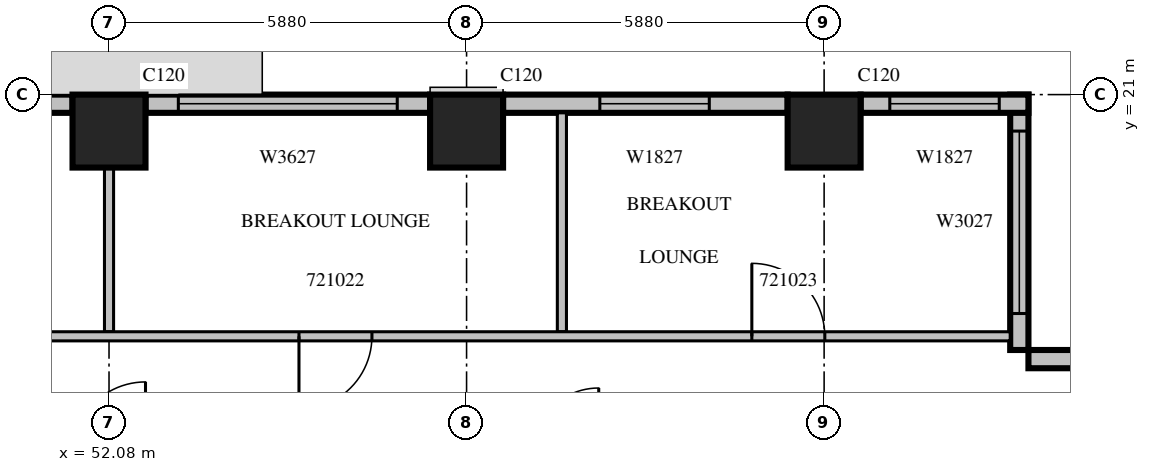
"""IFC4 building model, lengths in metres.
Left out: names, types, materials, properties, quantities, classifications, styles, units other than length and angle.
Written with IfcOpenShell. Run it as: python <this file> out.ifc"""

import sys

from ifc_helpers import new_model, si_unit, direction, frame, frame_2d, origin, origin_2d, place, context, subcontext, project, spatial, rectangle, extrude, source, transform, mapped, element, fill, save


model = new_model("IFC4")
c1 = context("Model", 3, precision=1e-05, world=origin(), true_north=direction((0.0, 1.0)))
c2 = subcontext(c1, "Body", "Model", "MODEL_VIEW")
j1 = project(units=[si_unit("LENGTHUNIT", "METRE"), si_unit("PLANEANGLEUNIT", "RADIAN")], contexts=[c1])
p1 = place(None, origin())
s1 = spatial("IfcSite", under=j1, at=p1, CompositionType="ELEMENT")
p2 = place(p1, origin())
s2 = spatial("IfcBuilding", under=s1, at=p2, CompositionType="ELEMENT")
p3 = place(p2, frame((0.0, 0.0, 99.3)))
s3 = spatial("IfcBuildingStorey", under=s2, at=p3, CompositionType="ELEMENT", Elevation=99.3)
m1 = source(origin(), c2, "Body", "SweptSolid", [
    extrude(rectangle(XDim=1.2, YDim=1.2, at=origin_2d()), origin(), (0.0, 0.0, 1.0), 4.2),
])
for number, where, z_axis, x_axis in (
    (1, (52.08, 20.4, 0.0), (0.0, 0.0, 1.0), (1.0, 0.0, 0.0)),
    (2, (57.96, 20.4, 0.0), (0.0, 0.0, 1.0), (1.0, 0.0, 0.0)),
    (3, (63.84, 20.4, 0.0), (0.0, 0.0, 1.0), (1.0, 0.0, 0.0)),
):
    element("IfcColumn", number, at=place(p3, frame(where, z_axis=z_axis, x_axis=x_axis)), inside=s3, PredefinedType="COLUMN", context=c2, shape_type="MappedRepresentation", body=[
        mapped(m1, transform((0.0, 0.0, 0.0), scale=1.0)),
    ])
m2 = source(origin(), c2, "Body", "SweptSolid", [
    extrude(rectangle(XDim=4.2, YDim=0.3, at=frame_2d((2.1, 0.0))), origin(), (0.0, 0.0, 1.0), 3.8),
])
p4 = place(p3, frame((71.4, 16.65, 0.0), z_axis=(0.0, 0.0, 1.0), x_axis=(-1.0, 0.0, 0.0)))
e4 = element("IfcWall", 4, at=p4, inside=s3, PredefinedType="STANDARD", context=c2, shape_type="MappedRepresentation", body=[
    mapped(m2, transform((0.0, 0.0, 0.0), scale=1.0)),
])
m3 = source(origin(), c2, "Body", "SweptSolid", [
    extrude(rectangle(XDim=1.2, YDim=2.7, at=frame_2d((0.6, 1.35))), frame((0.0, 0.16, 0.0), z_axis=(0.0, -1.0, 0.0), x_axis=(1.0, 0.0, 0.0)), (0.0, 0.0, 1.0), 0.32),
])
p5 = place(p4, frame((0.66, 0.0, 0.6)))
e5 = element("IfcOpeningElement", 5, at=p5, cuts=e4, PredefinedType="OPENING", context=c2, shape_type="MappedRepresentation", body=[
    mapped(m3, transform((0.0, 0.0, 0.0), scale=1.0)),
])
p6 = place(p3, frame((67.05, 16.8, 0.0), z_axis=(0.0, 0.0, 1.0), x_axis=(0.0, 1.0, 0.0)))
e6 = element("IfcWall", 6, at=p6, inside=s3, PredefinedType="STANDARD", context=c2, shape_type="MappedRepresentation", body=[
    mapped(m2, transform((0.0, 0.0, 0.0), scale=1.0)),
])
m4 = source(origin(), c2, "Body", "SweptSolid", [
    extrude(rectangle(XDim=3.0, YDim=2.7, at=frame_2d((1.5, 1.35))), frame((0.0, 0.16, 0.0), z_axis=(0.0, -1.0, 0.0), x_axis=(1.0, 0.0, 0.0)), (0.0, 0.0, 1.0), 0.32),
])
p7 = place(p6, frame((0.6, 0.0, 0.6)))
e7 = element("IfcOpeningElement", 7, at=p7, cuts=e6, PredefinedType="OPENING", context=c2, shape_type="MappedRepresentation", body=[
    mapped(m4, transform((0.0, 0.0, 0.0), scale=1.0)),
])
m5 = source(origin(), c2, "Body", "SweptSolid", [
    extrude(rectangle(XDim=2.76, YDim=0.3, at=frame_2d((1.38, 0.0))), origin(), (0.0, 0.0, 1.0), 3.8),
])
p8 = place(p3, frame((67.2, 20.85, 0.0), z_axis=(0.0, 0.0, 1.0), x_axis=(-1.0, 0.0, 0.0)))
e8 = element("IfcWall", 8, at=p8, inside=s3, PredefinedType="STANDARD", context=c2, shape_type="MappedRepresentation", body=[
    mapped(m5, transform((0.0, 0.0, 0.0), scale=1.0)),
])
m6 = source(origin(), c2, "Body", "SweptSolid", [
    extrude(rectangle(XDim=1.8, YDim=2.7, at=frame_2d((0.9, 1.35))), frame((0.0, 0.16, 0.0), z_axis=(0.0, -1.0, 0.0), x_axis=(1.0, 0.0, 0.0)), (0.0, 0.0, 1.0), 0.32),
])
p9 = place(p8, frame((0.48, 0.0, 0.6)))
e9 = element("IfcOpeningElement", 9, at=p9, cuts=e8, PredefinedType="OPENING", context=c2, shape_type="MappedRepresentation", body=[
    mapped(m6, transform((0.0, 0.0, 0.0), scale=1.0)),
])
m7 = source(origin(), c2, "Body", "SweptSolid", [
    extrude(rectangle(XDim=4.68, YDim=0.3, at=frame_2d((2.34, 0.0))), origin(), (0.0, 0.0, 1.0), 3.8),
])
p10 = place(p3, frame((63.24, 20.85, 0.0), z_axis=(0.0, 0.0, 1.0), x_axis=(-1.0, 0.0, 0.0)))
e10 = element("IfcWall", 10, at=p10, inside=s3, PredefinedType="STANDARD", context=c2, shape_type="MappedRepresentation", body=[
    mapped(m7, transform((0.0, 0.0, 0.0), scale=1.0)),
])
p11 = place(p10, frame((1.288, 0.0, 0.6)))
e11 = element("IfcOpeningElement", 11, at=p11, cuts=e10, PredefinedType="OPENING", context=c2, shape_type="MappedRepresentation", body=[
    mapped(m6, transform((0.0, 0.0, 0.0), scale=1.0)),
])
p12 = place(p3, frame((57.36, 20.85, 0.0), z_axis=(0.0, 0.0, 1.0), x_axis=(-1.0, 0.0, 0.0)))
e12 = element("IfcWall", 12, at=p12, inside=s3, PredefinedType="STANDARD", context=c2, shape_type="MappedRepresentation", body=[
    mapped(m7, transform((0.0, 0.0, 0.0), scale=1.0)),
])
m8 = source(origin(), c2, "Body", "SweptSolid", [
    extrude(rectangle(XDim=3.6, YDim=2.7, at=frame_2d((1.8, 1.35))), frame((0.0, 0.16, 0.0), z_axis=(0.0, -1.0, 0.0), x_axis=(1.0, 0.0, 0.0)), (0.0, 0.0, 1.0), 0.32),
])
p13 = place(p12, frame((0.54, 0.0, 0.6)))
e13 = element("IfcOpeningElement", 13, at=p13, cuts=e12, PredefinedType="OPENING", context=c2, shape_type="MappedRepresentation", body=[
    mapped(m8, transform((0.0, 0.0, 0.0), scale=1.0)),
])
p14 = place(p3, frame((51.48, 20.85, 0.0), z_axis=(0.0, 0.0, 1.0), x_axis=(-1.0, 0.0, 0.0)))
e14 = element("IfcWall", 14, at=p14, inside=s3, PredefinedType="STANDARD", context=c2, shape_type="MappedRepresentation", body=[
    mapped(m7, transform((0.0, 0.0, 0.0), scale=1.0)),
])
p15 = place(p14, frame((2.395, 0.0, 0.6)))
e15 = element("IfcOpeningElement", 15, at=p15, cuts=e14, PredefinedType="OPENING", context=c2, shape_type="MappedRepresentation", body=[
    mapped(m3, transform((0.0, 0.0, 0.0), scale=1.0)),
])
m9 = source(origin(), c2, "Body", "SweptSolid", [
    extrude(rectangle(XDim=3.6, YDim=0.15, at=frame_2d((1.8, 0.0))), origin(), (0.0, 0.0, 1.0), 3.8),
])
p16 = place(p3, frame((59.528, 20.7, 0.0), z_axis=(0.0, 0.0, 1.0), x_axis=(0.0, -1.0, 0.0)))
e16 = element("IfcWall", 16, at=p16, inside=s3, PredefinedType="PARTITIONING", context=c2, shape_type="MappedRepresentation", body=[
    mapped(m9, transform((0.0, 0.0, 0.0), scale=1.0)),
])
m10 = source(origin(), c2, "Body", "SweptSolid", [
    extrude(rectangle(XDim=2.701, YDim=0.15, at=frame_2d((1.351, 0.0))), origin(), (0.0, 0.0, 1.0), 3.8),
])
p17 = place(p3, frame((52.08, 17.1, 0.0), z_axis=(0.0, 0.0, 1.0), x_axis=(0.0, 1.0, 0.0)))
e17 = element("IfcWall", 17, at=p17, inside=s3, PredefinedType="PARTITIONING", context=c2, shape_type="MappedRepresentation", body=[
    mapped(m10, transform((0.0, 0.0, 0.0), scale=1.0)),
])
m11 = source(origin(), c2, "Body", "SweptSolid", [
    extrude(rectangle(XDim=37.5, YDim=0.15, at=frame_2d((18.75, 0.0))), origin(), (0.0, 0.0, 1.0), 3.3),
])
p18 = place(p3, frame((29.4, 17.025, 0.0), z_axis=(0.0, 0.0, 1.0), x_axis=(1.0, 0.0, 0.0)))
e18 = element("IfcWall", 18, at=p18, inside=s3, PredefinedType="PARTITIONING", context=c2, shape_type="MappedRepresentation", body=[
    mapped(m11, transform((0.0, 0.0, 0.0), scale=1.0)),
])
m12 = source(origin(), c2, "Body", "SweptSolid", [
    extrude(rectangle(XDim=1.0, YDim=2.1, at=frame_2d((0.5, 1.05))), frame((0.0, 0.085, 0.0), z_axis=(0.0, -1.0, 0.0), x_axis=(1.0, 0.0, 0.0)), (0.0, 0.0, 1.0), 0.17),
])
p19 = place(p18, frame((1.357, 0.0, 0.0)))
e19 = element("IfcOpeningElement", 19, at=p19, cuts=e18, PredefinedType="OPENING", context=c2, shape_type="MappedRepresentation", body=[
    mapped(m12, transform((0.0, 0.0, 0.0), scale=1.0)),
])
p20 = place(p18, frame((4.669, 0.0, 0.0)))
e20 = element("IfcOpeningElement", 20, at=p20, cuts=e18, PredefinedType="OPENING", context=c2, shape_type="MappedRepresentation", body=[
    mapped(m12, transform((0.0, 0.0, 0.0), scale=1.0)),
])
p21 = place(p18, frame((7.012, 0.0, 0.0)))
e21 = element("IfcOpeningElement", 21, at=p21, cuts=e18, PredefinedType="OPENING", context=c2, shape_type="MappedRepresentation", body=[
    mapped(m12, transform((0.0, 0.0, 0.0), scale=1.0)),
])
m13 = source(origin(), c2, "Body", "SweptSolid", [
    extrude(rectangle(XDim=0.9, YDim=2.1, at=frame_2d((0.45, 1.05))), frame((0.0, 0.085, 0.0), z_axis=(0.0, -1.0, 0.0), x_axis=(1.0, 0.0, 0.0)), (0.0, 0.0, 1.0), 0.17),
])
p22 = place(p18, frame((10.342, 0.0, 0.0)))
e22 = element("IfcOpeningElement", 22, at=p22, cuts=e18, PredefinedType="OPENING", context=c2, shape_type="MappedRepresentation", body=[
    mapped(m13, transform((0.0, 0.0, 0.0), scale=1.0)),
])
p23 = place(p18, frame((15.09, 0.0, 0.0)))
e23 = element("IfcOpeningElement", 23, at=p23, cuts=e18, PredefinedType="OPENING", context=c2, shape_type="MappedRepresentation", body=[
    mapped(m13, transform((0.0, 0.0, 0.0), scale=1.0)),
])
p24 = place(p18, frame((19.837, 0.0, 0.0)))
e24 = element("IfcOpeningElement", 24, at=p24, cuts=e18, PredefinedType="OPENING", context=c2, shape_type="MappedRepresentation", body=[
    mapped(m13, transform((0.0, 0.0, 0.0), scale=1.0)),
])
m14 = source(origin(), c2, "Body", "SweptSolid", [
    extrude(rectangle(XDim=1.2, YDim=2.1, at=frame_2d((0.6, 1.05))), frame((0.0, 0.085, 0.0), z_axis=(0.0, -1.0, 0.0), x_axis=(1.0, 0.0, 0.0)), (0.0, 0.0, 1.0), 0.17),
])
p25 = place(p18, frame((25.804, 0.0, 0.0)))
e25 = element("IfcOpeningElement", 25, at=p25, cuts=e18, PredefinedType="OPENING", context=c2, shape_type="MappedRepresentation", body=[
    mapped(m14, transform((0.0, 0.0, 0.0), scale=1.0)),
])
p26 = place(p18, frame((33.251, 0.0, 0.0)))
e26 = element("IfcOpeningElement", 26, at=p26, cuts=e18, PredefinedType="OPENING", context=c2, shape_type="MappedRepresentation", body=[
    mapped(m14, transform((0.0, 0.0, 0.0), scale=1.0)),
])
m15 = source(origin(), c2, "Body", "SweptSolid", [
    extrude(rectangle(XDim=3.0, YDim=2.7, at=frame_2d((1.5, 1.35))), frame((0.0, 0.03, 0.0), z_axis=(0.0, -1.0, 0.0), x_axis=(1.0, 0.0, 0.0)), (0.0, 0.0, 1.0), 0.06),
])
p27 = place(p7, origin())
e27 = element("IfcWindow", 27, at=p27, inside=s3, PartitioningType="SINGLE_PANEL", PredefinedType="WINDOW", context=c2, shape_type="MappedRepresentation", body=[
    mapped(m15, transform((0.0, 0.0, 0.0), scale=1.0)),
])
fill(e7, e27)
m16 = source(origin(), c2, "Body", "SweptSolid", [
    extrude(rectangle(XDim=1.8, YDim=2.7, at=frame_2d((0.9, 1.35))), frame((0.0, 0.03, 0.0), z_axis=(0.0, -1.0, 0.0), x_axis=(1.0, 0.0, 0.0)), (0.0, 0.0, 1.0), 0.06),
])
p28 = place(p11, origin())
e28 = element("IfcWindow", 28, at=p28, inside=s3, PartitioningType="SINGLE_PANEL", PredefinedType="WINDOW", context=c2, shape_type="MappedRepresentation", body=[
    mapped(m16, transform((0.0, 0.0, 0.0), scale=1.0)),
])
fill(e11, e28)
p29 = place(p9, origin())
e29 = element("IfcWindow", 29, at=p29, inside=s3, PartitioningType="SINGLE_PANEL", PredefinedType="WINDOW", context=c2, shape_type="MappedRepresentation", body=[
    mapped(m16, transform((0.0, 0.0, 0.0), scale=1.0)),
])
fill(e9, e29)
m17 = source(origin(), c2, "Body", "SweptSolid", [
    extrude(rectangle(XDim=3.6, YDim=2.7, at=frame_2d((1.8, 1.35))), frame((0.0, 0.03, 0.0), z_axis=(0.0, -1.0, 0.0), x_axis=(1.0, 0.0, 0.0)), (0.0, 0.0, 1.0), 0.06),
])
p30 = place(p13, origin())
e30 = element("IfcWindow", 30, at=p30, inside=s3, PartitioningType="SINGLE_PANEL", PredefinedType="WINDOW", context=c2, shape_type="MappedRepresentation", body=[
    mapped(m17, transform((0.0, 0.0, 0.0), scale=1.0)),
])
fill(e13, e30)
m18 = source(origin(), c2, "Body", "SweptSolid", [
    extrude(rectangle(XDim=1.2, YDim=2.1, at=frame_2d((0.6, 1.05))), frame((0.0, 0.025, 0.0), z_axis=(0.0, -1.0, 0.0), x_axis=(1.0, 0.0, 0.0)), (0.0, 0.0, 1.0), 0.05),
])
p31 = place(p25, origin())
e31 = element("IfcDoor", 31, at=p31, inside=s3, OperationType="SINGLE_SWING_RIGHT", PredefinedType="DOOR", context=c2, shape_type="MappedRepresentation", body=[
    mapped(m18, transform((0.0, 0.0, 0.0), scale=1.0)),
])
fill(e25, e31)
p32 = place(p26, origin())
e32 = element("IfcDoor", 32, at=p32, inside=s3, OperationType="SINGLE_SWING_LEFT", PredefinedType="DOOR", context=c2, shape_type="MappedRepresentation", body=[
    mapped(m18, transform((0.0, 0.0, 0.0), scale=1.0)),
])
fill(e26, e32)
save(model, sys.argv[1])
